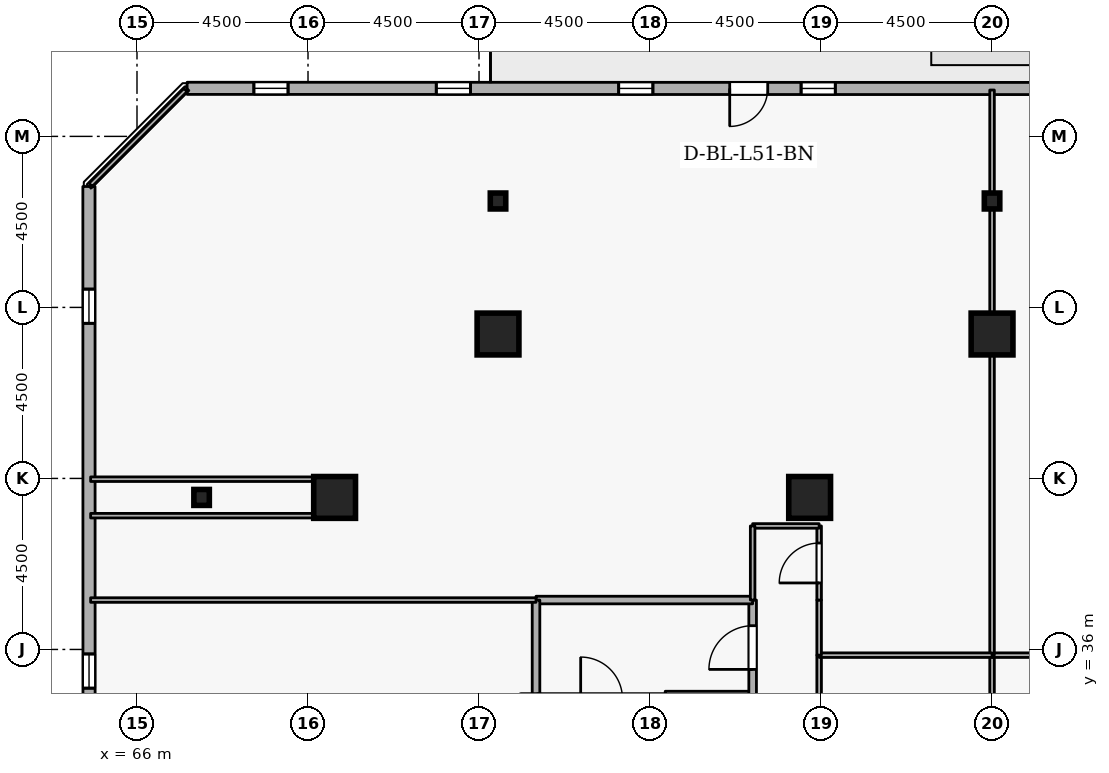
"""IFC4 building model, lengths in metres.
Left out: names, types, materials, properties, quantities, classifications, styles, units other than length and angle.
Written with IfcOpenShell. Run it as: python <this file> out.ifc"""

import sys

from ifc_helpers import new_model, si_unit, direction, frame, frame_2d, origin, origin_2d, place, context, subcontext, project, spatial, rectangle, i_section, extrude, element, fill, save


model = new_model("IFC4")
c1 = context("Model", 3, precision=1e-05, world=origin(), true_north=direction((0.0, 1.0)))
c2 = subcontext(c1, "Body", "Model", "MODEL_VIEW")
j1 = project(units=[si_unit("LENGTHUNIT", "METRE"), si_unit("PLANEANGLEUNIT", "RADIAN")], contexts=[c1])
p1 = place(None, origin())
s1 = spatial("IfcSite", under=j1, at=p1, CompositionType="ELEMENT")
p2 = place(p1, origin())
s2 = spatial("IfcBuilding", under=s1, at=p2, CompositionType="ELEMENT")
p3 = place(p2, frame((0.0, 0.0, 192.9)))
s3 = spatial("IfcBuildingStorey", under=s2, at=p3, CompositionType="ELEMENT", Elevation=192.9)
for number, where, z_axis, x_axis in (
    (1, (88.5, 44.3, 0.0), (0.0, 0.0, 1.0), (1.0, 0.0, 0.0)),
    (2, (75.5, 44.3, 0.0), (0.0, 0.0, 1.0), (1.0, 0.0, 0.0)),
    (3, (71.2, 40.0, 0.0), (0.0, 0.0, 1.0), (1.0, 0.0, 0.0)),
    (4, (83.7, 40.0, 0.0), (0.0, 0.0, 1.0), (1.0, 0.0, 0.0)),
):
    element("IfcColumn", number, at=place(p3, frame(where, z_axis=z_axis, x_axis=x_axis)), inside=s3, PredefinedType="COLUMN", context=c2, shape_type="SweptSolid", body=[
        extrude(rectangle(XDim=1.1, YDim=1.1, at=origin_2d()), origin(), (0.0, 0.0, 1.0), 3.6),
    ])
for number, where, z_axis, x_axis in (
    (5, (88.5, 47.8, 0.0), (0.0, 0.0, 1.0), (1.0, 0.0, 0.0)),
    (6, (75.5, 47.8, 0.0), (0.0, 0.0, 1.0), (1.0, 0.0, 0.0)),
    (7, (67.7, 40.0, 0.0), (0.0, 0.0, 1.0), (1.0, 0.0, 0.0)),
):
    element("IfcColumn", number, at=place(p3, frame(where, z_axis=z_axis, x_axis=x_axis)), inside=s3, PredefinedType="COLUMN", context=c2, shape_type="SweptSolid", body=[
        extrude(i_section(OverallWidth=0.407, OverallDepth=0.419, WebThickness=0.031, FlangeThickness=0.049, FilletRadius=0.015, at=origin_2d()), origin(), (0.0, 0.0, 1.0), 3.6),
    ])
p4 = place(p3, frame((101.475, 50.757, 0.0), z_axis=(0.0, 0.0, 1.0), x_axis=(-0.99999997701, 0.000214431216, 0.0)))
e8 = element("IfcWall", 8, at=p4, inside=s3, PredefinedType="STANDARD", context=c2, shape_type="SweptSolid", body=[
    extrude(rectangle(XDim=34.156, YDim=0.32, at=frame_2d((17.078, 0.0))), origin(), (0.0, 0.0, 1.0), 2.7),
])
p5 = place(p4, frame((18.878, 0.0, 0.0)))
e9 = element("IfcOpeningElement", 9, at=p5, cuts=e8, PredefinedType="OPENING", context=c2, shape_type="SweptSolid", body=[
    extrude(rectangle(XDim=1.0, YDim=2.08, at=frame_2d((0.5, 1.04))), frame((0.0, 0.17, 0.0), z_axis=(0.0, -1.0, 0.0), x_axis=(1.0, 0.0, 0.0)), (0.0, 0.0, 1.0), 0.34),
])
p6 = place(p4, frame((2.7, 0.0, 0.72)))
e10 = element("IfcOpeningElement", 10, at=p6, cuts=e8, PredefinedType="OPENING", context=c2, shape_type="SweptSolid", body=[
    extrude(rectangle(XDim=0.9, YDim=1.75, at=frame_2d((0.45, 0.875))), frame((0.0, 0.17, 0.0), z_axis=(0.0, -1.0, 0.0), x_axis=(1.0, 0.0, 0.0)), (0.0, 0.0, 1.0), 0.34),
])
p7 = place(p4, frame((7.5, 0.0, 0.72)))
e11 = element("IfcOpeningElement", 11, at=p7, cuts=e8, PredefinedType="OPENING", context=c2, shape_type="SweptSolid", body=[
    extrude(rectangle(XDim=0.9, YDim=1.75, at=frame_2d((0.45, 0.875))), frame((0.0, 0.17, 0.0), z_axis=(0.0, -1.0, 0.0), x_axis=(1.0, 0.0, 0.0)), (0.0, 0.0, 1.0), 0.34),
])
p8 = place(p4, frame((17.1, 0.0, 0.72)))
e12 = element("IfcOpeningElement", 12, at=p8, cuts=e8, PredefinedType="OPENING", context=c2, shape_type="SweptSolid", body=[
    extrude(rectangle(XDim=0.9, YDim=1.75, at=frame_2d((0.45, 0.875))), frame((0.0, 0.17, 0.0), z_axis=(0.0, -1.0, 0.0), x_axis=(1.0, 0.0, 0.0)), (0.0, 0.0, 1.0), 0.34),
])
p9 = place(p4, frame((21.9, 0.0, 0.72)))
e13 = element("IfcOpeningElement", 13, at=p9, cuts=e8, PredefinedType="OPENING", context=c2, shape_type="SweptSolid", body=[
    extrude(rectangle(XDim=0.9, YDim=1.75, at=frame_2d((0.45, 0.875))), frame((0.0, 0.17, 0.0), z_axis=(0.0, -1.0, 0.0), x_axis=(1.0, 0.0, 0.0)), (0.0, 0.0, 1.0), 0.34),
])
p10 = place(p4, frame((26.7, 0.0, 0.72)))
e14 = element("IfcOpeningElement", 14, at=p10, cuts=e8, PredefinedType="OPENING", context=c2, shape_type="SweptSolid", body=[
    extrude(rectangle(XDim=0.9, YDim=1.75, at=frame_2d((0.45, 0.875))), frame((0.0, 0.17, 0.0), z_axis=(0.0, -1.0, 0.0), x_axis=(1.0, 0.0, 0.0)), (0.0, 0.0, 1.0), 0.34),
])
p11 = place(p4, frame((31.5, 0.0, 0.72)))
e15 = element("IfcOpeningElement", 15, at=p11, cuts=e8, PredefinedType="OPENING", context=c2, shape_type="SweptSolid", body=[
    extrude(rectangle(XDim=0.9, YDim=1.75, at=frame_2d((0.45, 0.875))), frame((0.0, 0.17, 0.0), z_axis=(0.0, -1.0, 0.0), x_axis=(1.0, 0.0, 0.0)), (0.0, 0.0, 1.0), 0.34),
])
p12 = place(p3, frame((64.735, 48.181, 0.0), z_axis=(0.0, 0.0, 1.0), x_axis=(0.000214431216, -0.99999997701, 0.0)))
e16 = element("IfcWall", 16, at=p12, inside=s3, PredefinedType="STANDARD", context=c2, shape_type="SweptSolid", body=[
    extrude(rectangle(XDim=34.156, YDim=0.32, at=frame_2d((17.078, 0.0))), origin(), (0.0, 0.0, 1.0), 2.7),
])
p13 = place(p12, frame((2.7, 0.0, 0.72)))
e17 = element("IfcOpeningElement", 17, at=p13, cuts=e16, PredefinedType="OPENING", context=c2, shape_type="SweptSolid", body=[
    extrude(rectangle(XDim=0.9, YDim=1.75, at=frame_2d((0.45, 0.875))), frame((0.0, 0.17, 0.0), z_axis=(0.0, -1.0, 0.0), x_axis=(1.0, 0.0, 0.0)), (0.0, 0.0, 1.0), 0.34),
])
p14 = place(p12, frame((12.3, 0.0, 0.72)))
e18 = element("IfcOpeningElement", 18, at=p14, cuts=e16, PredefinedType="OPENING", context=c2, shape_type="SweptSolid", body=[
    extrude(rectangle(XDim=0.9, YDim=1.75, at=frame_2d((0.45, 0.875))), frame((0.0, 0.17, 0.0), z_axis=(0.0, -1.0, 0.0), x_axis=(1.0, 0.0, 0.0)), (0.0, 0.0, 1.0), 0.34),
])
p15 = place(p12, frame((17.1, 0.0, 0.72)))
e19 = element("IfcOpeningElement", 19, at=p15, cuts=e16, PredefinedType="OPENING", context=c2, shape_type="SweptSolid", body=[
    extrude(rectangle(XDim=0.9, YDim=1.75, at=frame_2d((0.45, 0.875))), frame((0.0, 0.17, 0.0), z_axis=(0.0, -1.0, 0.0), x_axis=(1.0, 0.0, 0.0)), (0.0, 0.0, 1.0), 0.34),
])
p16 = place(p12, frame((21.9, 0.0, 0.72)))
e20 = element("IfcOpeningElement", 20, at=p16, cuts=e16, PredefinedType="OPENING", context=c2, shape_type="SweptSolid", body=[
    extrude(rectangle(XDim=0.9, YDim=1.75, at=frame_2d((0.45, 0.875))), frame((0.0, 0.17, 0.0), z_axis=(0.0, -1.0, 0.0), x_axis=(1.0, 0.0, 0.0)), (0.0, 0.0, 1.0), 0.34),
])
p17 = place(p12, frame((26.7, 0.0, 0.72)))
e21 = element("IfcOpeningElement", 21, at=p17, cuts=e16, PredefinedType="OPENING", context=c2, shape_type="SweptSolid", body=[
    extrude(rectangle(XDim=0.9, YDim=1.75, at=frame_2d((0.45, 0.875))), frame((0.0, 0.17, 0.0), z_axis=(0.0, -1.0, 0.0), x_axis=(1.0, 0.0, 0.0)), (0.0, 0.0, 1.0), 0.34),
])
p18 = place(p12, frame((31.5, 0.0, 0.72)))
e22 = element("IfcOpeningElement", 22, at=p18, cuts=e16, PredefinedType="OPENING", context=c2, shape_type="SweptSolid", body=[
    extrude(rectangle(XDim=0.9, YDim=1.75, at=frame_2d((0.45, 0.875))), frame((0.0, 0.17, 0.0), z_axis=(0.0, -1.0, 0.0), x_axis=(1.0, 0.0, 0.0)), (0.0, 0.0, 1.0), 0.34),
])
p19 = place(p3, frame((79.9, 34.8, 0.0), z_axis=(0.0, 0.0, 1.0), x_axis=(1.0, 0.0, 0.0)))
e23 = element("IfcWall", 23, at=p19, inside=s3, PredefinedType="STANDARD", context=c2, shape_type="SweptSolid", body=[
    extrude(rectangle(XDim=2.3, YDim=0.2, at=frame_2d((1.15, 0.0))), origin(), (0.0, 0.0, 1.0), 2.545),
])
p20 = place(p3, frame((82.2, 34.8, 0.0), z_axis=(0.0, 0.0, 1.0), x_axis=(0.0, 1.0, 0.0)))
e24 = element("IfcWall", 24, at=p20, inside=s3, PredefinedType="STANDARD", context=c2, shape_type="SweptSolid", body=[
    extrude(rectangle(XDim=2.5, YDim=0.2, at=frame_2d((1.25, 0.0))), origin(), (0.0, 0.0, 1.0), 3.34),
])
p21 = place(p20, frame((0.675, 0.0, 0.0)))
e25 = element("IfcOpeningElement", 25, at=p21, cuts=e24, PredefinedType="OPENING", context=c2, shape_type="SweptSolid", body=[
    extrude(rectangle(XDim=1.15, YDim=2.1, at=frame_2d((0.575, 1.05))), frame((0.0, 0.11, 0.0), z_axis=(0.0, -1.0, 0.0), x_axis=(1.0, 0.0, 0.0)), (0.0, 0.0, 1.0), 0.22),
])
p22 = place(p3, frame((82.2, 37.3, 0.0), z_axis=(0.0, 0.0, 1.0), x_axis=(-1.0, 0.0, 0.0)))
e26 = element("IfcWall", 26, at=p22, inside=s3, PredefinedType="STANDARD", context=c2, shape_type="SweptSolid", body=[
    extrude(rectangle(XDim=5.7, YDim=0.2, at=frame_2d((2.85, 0.0))), origin(), (0.0, 0.0, 1.0), 3.34),
])
p23 = place(p3, frame((76.5, 37.3, 0.0), z_axis=(0.0, 0.0, 1.0), x_axis=(0.0, -1.0, 0.0)))
e27 = element("IfcWall", 27, at=p23, inside=s3, PredefinedType="STANDARD", context=c2, shape_type="SweptSolid", body=[
    extrude(rectangle(XDim=2.5, YDim=0.2, at=frame_2d((1.25, 0.0))), origin(), (0.0, 0.0, 1.0), 3.34),
])
p24 = place(p3, frame((88.5, 33.95, 0.0), z_axis=(0.0, 0.0, 1.0), x_axis=(0.0, 1.0, 0.0)))
e28 = element("IfcWall", 28, at=p24, inside=s3, PredefinedType="PARTITIONING", context=c2, shape_type="SweptSolid", body=[
    extrude(rectangle(XDim=1.9, YDim=0.12, at=frame_2d((0.95, 0.0))), origin(), (0.0, 0.0, 1.0), 3.34),
])
p25 = place(p3, frame((88.5, 35.85, 0.0), z_axis=(0.0, 0.0, 1.0), x_axis=(1.0, 0.0, 0.0)))
e29 = element("IfcWall", 29, at=p25, inside=s3, PredefinedType="PARTITIONING", context=c2, shape_type="SweptSolid", body=[
    extrude(rectangle(XDim=4.55, YDim=0.12, at=frame_2d((2.275, 0.0))), origin(), (0.0, 0.0, 1.0), 3.34),
])
p26 = place(p3, frame((88.5, 35.85, 0.0), z_axis=(0.0, 0.0, 1.0), x_axis=(0.0, 1.0, 0.0)))
e30 = element("IfcWall", 30, at=p26, inside=s3, PredefinedType="PARTITIONING", context=c2, shape_type="SweptSolid", body=[
    extrude(rectangle(XDim=14.87, YDim=0.12, at=frame_2d((7.435, 0.0))), origin(), (0.0, 0.0, 1.0), 2.882),
])
p27 = place(p3, frame((83.95, 33.95, 0.0), z_axis=(0.0, 0.0, 1.0), x_axis=(0.0, 1.0, 0.0)))
e31 = element("IfcWall", 31, at=p27, inside=s3, PredefinedType="PARTITIONING", context=c2, shape_type="SweptSolid", body=[
    extrude(rectangle(XDim=1.9, YDim=0.12, at=frame_2d((0.95, 0.0))), origin(), (0.0, 0.0, 1.0), 3.34),
])
p28 = place(p3, frame((83.95, 35.85, 0.0), z_axis=(0.0, 0.0, 1.0), x_axis=(1.0, 0.0, 0.0)))
e32 = element("IfcWall", 32, at=p28, inside=s3, PredefinedType="PARTITIONING", context=c2, shape_type="SweptSolid", body=[
    extrude(rectangle(XDim=4.55, YDim=0.12, at=frame_2d((2.275, 0.0))), origin(), (0.0, 0.0, 1.0), 3.34),
])
p29 = place(p3, frame((83.95, 35.85, 0.0), z_axis=(0.0, 0.0, 1.0), x_axis=(0.0, 1.0, 0.0)))
e33 = element("IfcWall", 33, at=p29, inside=s3, PredefinedType="PARTITIONING", context=c2, shape_type="SweptSolid", body=[
    extrude(rectangle(XDim=1.45, YDim=0.12, at=frame_2d((0.725, 0.0))), origin(), (0.0, 0.0, 1.0), 3.34),
])
p30 = place(p3, frame((83.95, 37.3, 0.0), z_axis=(0.0, 0.0, 1.0), x_axis=(0.0, 1.0, 0.0)))
e34 = element("IfcWall", 34, at=p30, inside=s3, PredefinedType="PARTITIONING", context=c2, shape_type="SweptSolid", body=[
    extrude(rectangle(XDim=1.95, YDim=0.12, at=frame_2d((0.975, 0.0))), origin(), (0.0, 0.0, 1.0), 3.34),
])
p31 = place(p30, frame((0.45, 0.0, 0.0)))
e35 = element("IfcOpeningElement", 35, at=p31, cuts=e34, PredefinedType="OPENING", context=c2, shape_type="SweptSolid", body=[
    extrude(rectangle(XDim=1.05, YDim=2.1, at=frame_2d((0.525, 1.05))), frame((0.0, 0.07, 0.0), z_axis=(0.0, -1.0, 0.0), x_axis=(1.0, 0.0, 0.0)), (0.0, 0.0, 1.0), 0.14),
])
p32 = place(p3, frame((83.95, 39.25, 0.0), z_axis=(0.0, 0.0, 1.0), x_axis=(-1.0, 0.0, 0.0)))
e36 = element("IfcWall", 36, at=p32, inside=s3, PredefinedType="PARTITIONING", context=c2, shape_type="SweptSolid", body=[
    extrude(rectangle(XDim=1.75, YDim=0.12, at=frame_2d((0.875, 0.0))), origin(), (0.0, 0.0, 1.0), 3.34),
])
p33 = place(p3, frame((82.2, 39.25, 0.0), z_axis=(0.0, 0.0, 1.0), x_axis=(0.0, -1.0, 0.0)))
e37 = element("IfcWall", 37, at=p33, inside=s3, PredefinedType="PARTITIONING", context=c2, shape_type="SweptSolid", body=[
    extrude(rectangle(XDim=1.95, YDim=0.12, at=frame_2d((0.975, 0.0))), origin(), (0.0, 0.0, 1.0), 3.34),
])
p34 = place(p3, frame((76.5, 37.3, 0.0), z_axis=(0.0, 0.0, 1.0), x_axis=(-1.0, 0.0, 0.0)))
e38 = element("IfcWall", 38, at=p34, inside=s3, PredefinedType="PARTITIONING", context=c2, shape_type="SweptSolid", body=[
    extrude(rectangle(XDim=11.72, YDim=0.12, at=frame_2d((5.86, 0.0))), origin(), (0.0, 0.0, 1.0), 3.34),
])
for number, where, z_axis, x_axis in (
    (39, (64.78, 39.52, 0.0), (0.0, 0.0, 1.0), (1.0, 0.0, 0.0)),
    (40, (71.2, 40.48, 0.0), (0.0, 0.0, 1.0), (-1.0, 0.0, 0.0)),
):
    element("IfcWall", number, at=place(p3, frame(where, z_axis=z_axis, x_axis=x_axis)), inside=s3, PredefinedType="PARTITIONING", context=c2, shape_type="SweptSolid", body=[
        extrude(rectangle(XDim=6.42, YDim=0.12, at=frame_2d((3.21, 0.0))), origin(), (0.0, 0.0, 1.0), 3.34),
    ])
p35 = place(p3, frame((64.78, 48.225, 0.0), z_axis=(0.0, 0.0, 1.0), x_axis=(0.707106781187, 0.707106781187, 0.0)))
e41 = element("IfcWall", 41, at=p35, inside=s3, PredefinedType="PARTITIONING", context=c2, shape_type="SweptSolid", body=[
    extrude(rectangle(XDim=3.528, YDim=0.12, at=frame_2d((1.764, 0.0))), origin(), (0.0, 0.0, 1.0), 3.34),
])
p36 = place(p5, origin())
e42 = element("IfcDoor", 42, at=p36, inside=s3, OperationType="SINGLE_SWING_RIGHT", PredefinedType="DOOR", context=c2, shape_type="SweptSolid", body=[
    extrude(rectangle(XDim=1.0, YDim=2.08, at=frame_2d((0.5, 1.04))), frame((0.0, 0.025, 0.0), z_axis=(0.0, -1.0, 0.0), x_axis=(1.0, 0.0, 0.0)), (0.0, 0.0, 1.0), 0.05),
])
fill(e9, e42)
p37 = place(p8, origin())
e43 = element("IfcWindow", 43, at=p37, inside=s3, PartitioningType="SINGLE_PANEL", PredefinedType="WINDOW", context=c2, shape_type="SweptSolid", body=[
    extrude(rectangle(XDim=0.9, YDim=1.75, at=frame_2d((0.45, 0.875))), frame((0.0, 0.03, 0.0), z_axis=(0.0, -1.0, 0.0), x_axis=(1.0, 0.0, 0.0)), (0.0, 0.0, 1.0), 0.06),
])
fill(e12, e43)
p38 = place(p9, origin())
e44 = element("IfcWindow", 44, at=p38, inside=s3, PartitioningType="SINGLE_PANEL", PredefinedType="WINDOW", context=c2, shape_type="SweptSolid", body=[
    extrude(rectangle(XDim=0.9, YDim=1.75, at=frame_2d((0.45, 0.875))), frame((0.0, 0.03, 0.0), z_axis=(0.0, -1.0, 0.0), x_axis=(1.0, 0.0, 0.0)), (0.0, 0.0, 1.0), 0.06),
])
fill(e13, e44)
p39 = place(p10, origin())
e45 = element("IfcWindow", 45, at=p39, inside=s3, PartitioningType="SINGLE_PANEL", PredefinedType="WINDOW", context=c2, shape_type="SweptSolid", body=[
    extrude(rectangle(XDim=0.9, YDim=1.75, at=frame_2d((0.45, 0.875))), frame((0.0, 0.03, 0.0), z_axis=(0.0, -1.0, 0.0), x_axis=(1.0, 0.0, 0.0)), (0.0, 0.0, 1.0), 0.06),
])
fill(e14, e45)
p40 = place(p11, origin())
e46 = element("IfcWindow", 46, at=p40, inside=s3, PartitioningType="SINGLE_PANEL", PredefinedType="WINDOW", context=c2, shape_type="SweptSolid", body=[
    extrude(rectangle(XDim=0.9, YDim=1.75, at=frame_2d((0.45, 0.875))), frame((0.0, 0.03, 0.0), z_axis=(0.0, -1.0, 0.0), x_axis=(1.0, 0.0, 0.0)), (0.0, 0.0, 1.0), 0.06),
])
fill(e15, e46)
p41 = place(p13, origin())
e47 = element("IfcWindow", 47, at=p41, inside=s3, PartitioningType="SINGLE_PANEL", PredefinedType="WINDOW", context=c2, shape_type="SweptSolid", body=[
    extrude(rectangle(XDim=0.9, YDim=1.75, at=frame_2d((0.45, 0.875))), frame((0.0, 0.03, 0.0), z_axis=(0.0, -1.0, 0.0), x_axis=(1.0, 0.0, 0.0)), (0.0, 0.0, 1.0), 0.06),
])
fill(e17, e47)
p42 = place(p14, origin())
e48 = element("IfcWindow", 48, at=p42, inside=s3, PartitioningType="SINGLE_PANEL", PredefinedType="WINDOW", context=c2, shape_type="SweptSolid", body=[
    extrude(rectangle(XDim=0.9, YDim=1.75, at=frame_2d((0.45, 0.875))), frame((0.0, 0.03, 0.0), z_axis=(0.0, -1.0, 0.0), x_axis=(1.0, 0.0, 0.0)), (0.0, 0.0, 1.0), 0.06),
])
fill(e18, e48)
p43 = place(p21, origin())
e49 = element("IfcDoor", 49, at=p43, inside=s3, OperationType="SINGLE_SWING_LEFT", PredefinedType="DOOR", context=c2, shape_type="SweptSolid", body=[
    extrude(rectangle(XDim=1.15, YDim=2.1, at=frame_2d((0.575, 1.05))), frame((0.0, 0.025, 0.0), z_axis=(0.0, -1.0, 0.0), x_axis=(1.0, 0.0, 0.0)), (0.0, 0.0, 1.0), 0.05),
])
fill(e25, e49)
p44 = place(p31, origin())
e50 = element("IfcDoor", 50, at=p44, inside=s3, OperationType="SINGLE_SWING_LEFT", PredefinedType="DOOR", context=c2, shape_type="SweptSolid", body=[
    extrude(rectangle(XDim=1.05, YDim=2.1, at=frame_2d((0.525, 1.05))), frame((0.0, 0.025, 0.0), z_axis=(0.0, -1.0, 0.0), x_axis=(1.0, 0.0, 0.0)), (0.0, 0.0, 1.0), 0.05),
])
fill(e35, e50)
save(model, sys.argv[1])
